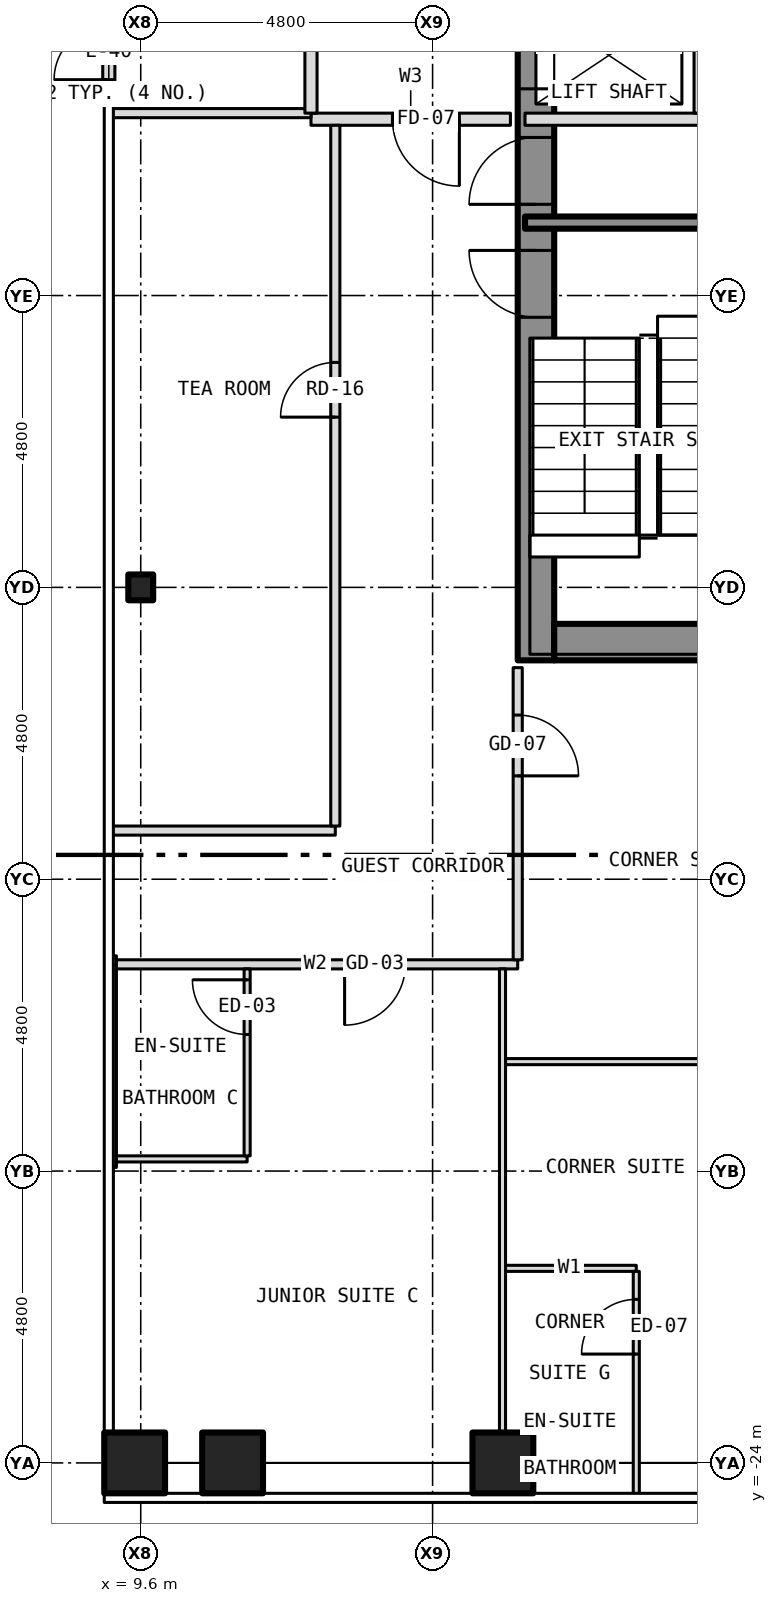
"""IFC4 building model, lengths in metres.
Left out: names, types, materials, properties, quantities, classifications, styles, units other than length and angle.
Written with IfcOpenShell. Run it as: python <this file> out.ifc"""

import sys

from ifc_helpers import new_model, si_unit, direction, frame, frame_2d, origin, origin_2d, place, context, subcontext, project, spatial, rectangle, hollow_rectangle, i_section, extrude, element, fill, save


model = new_model("IFC4")
c1 = context("Model", 3, precision=1e-05, world=origin(), true_north=direction((0.0, 1.0)))
c2 = subcontext(c1, "Body", "Model", "MODEL_VIEW")
j1 = project(units=[si_unit("LENGTHUNIT", "METRE"), si_unit("PLANEANGLEUNIT", "RADIAN")], contexts=[c1])
p1 = place(None, origin())
s1 = spatial("IfcSite", under=j1, at=p1, CompositionType="ELEMENT")
p2 = place(p1, origin())
s2 = spatial("IfcBuilding", under=s1, at=p2, CompositionType="ELEMENT")
p3 = place(p2, frame((0.0, 0.0, 81.0)))
s3 = spatial("IfcBuildingStorey", under=s2, at=p3, CompositionType="ELEMENT", Elevation=81.0)
for number, where, z_axis, x_axis in (
    (1, (11.111, -24.0, -0.15), (0.0, 0.0, 1.0), (1.0, 0.0, 0.0)),
    (2, (15.556, -24.0, -0.15), (0.0, 0.0, 1.0), (1.0, 0.0, 0.0)),
    (3, (9.5, -24.0, -0.15), (0.0, 0.0, 1.0), (1.0, 0.0, 0.0)),
):
    element("IfcColumn", number, at=place(p3, frame(where, z_axis=z_axis, x_axis=x_axis)), inside=s3, PredefinedType="COLUMN", context=c2, shape_type="SweptSolid", body=[
        extrude(hollow_rectangle(XDim=1.0, YDim=1.0, WallThickness=0.06, at=origin_2d()), origin(), (0.0, 0.0, 1.0), 3.35),
    ])
p4 = place(p3, frame((9.6, -9.6, -0.15), z_axis=(0.0, 0.0, 1.0), x_axis=(1.0, 0.0, 0.0)))
e4 = element("IfcColumn", 4, at=p4, inside=s3, PredefinedType="COLUMN", context=c2, shape_type="SweptSolid", body=[
    extrude(i_section(OverallWidth=0.409, OverallDepth=0.424, WebThickness=0.033, FlangeThickness=0.052, at=origin_2d()), origin(), (0.0, 0.0, 1.0), 3.35),
])
p5 = place(p3, frame((16.1, -10.8, 0.0), z_axis=(0.0, 0.0, 1.0), x_axis=(0.0, 1.0, 0.0)))
e5 = element("IfcWall", 5, at=p5, inside=s3, PredefinedType="SHEAR", context=c2, shape_type="SweptSolid", body=[
    extrude(rectangle(XDim=21.6, YDim=0.6, at=frame_2d((10.8, 0.0))), origin(), (0.0, 0.0, 1.0), 2.9),
])
p6 = place(p5, frame((9.4, 0.0, 0.0)))
e6 = element("IfcOpeningElement", 6, at=p6, cuts=e5, PredefinedType="OPENING", context=c2, shape_type="SweptSolid", body=[
    extrude(rectangle(XDim=1.1, YDim=2.1, at=frame_2d((0.55, 1.05))), frame((0.0, 0.312, 0.0), z_axis=(0.0, -1.0, 0.0), x_axis=(1.0, 0.0, 0.0)), (0.0, 0.0, 1.0), 0.624),
])
p7 = place(p5, frame((11.5, 0.0, 0.0)))
e7 = element("IfcOpeningElement", 7, at=p7, cuts=e5, PredefinedType="OPENING", context=c2, shape_type="SweptSolid", body=[
    extrude(rectangle(XDim=1.1, YDim=2.1, at=frame_2d((0.55, 1.05))), frame((0.0, 0.312, 0.0), z_axis=(0.0, -1.0, 0.0), x_axis=(1.0, 0.0, 0.0)), (0.0, 0.0, 1.0), 0.624),
])
p8 = place(p5, frame((13.6, 0.0, 0.0)))
e8 = element("IfcOpeningElement", 8, at=p8, cuts=e5, PredefinedType="OPENING", context=c2, shape_type="SweptSolid", body=[
    extrude(rectangle(XDim=1.1, YDim=2.1, at=frame_2d((0.55, 1.05))), frame((0.0, 0.312, 0.0), z_axis=(0.0, -1.0, 0.0), x_axis=(1.0, 0.0, 0.0)), (0.0, 0.0, 1.0), 0.624),
])
p9 = place(p5, frame((15.7, 0.0, 0.0)))
e9 = element("IfcOpeningElement", 9, at=p9, cuts=e5, PredefinedType="OPENING", context=c2, shape_type="SweptSolid", body=[
    extrude(rectangle(XDim=1.1, YDim=2.1, at=frame_2d((0.55, 1.05))), frame((0.0, 0.312, 0.0), z_axis=(0.0, -1.0, 0.0), x_axis=(1.0, 0.0, 0.0)), (0.0, 0.0, 1.0), 0.624),
])
p10 = place(p5, frame((17.8, 0.0, 0.0)))
e10 = element("IfcOpeningElement", 10, at=p10, cuts=e5, PredefinedType="OPENING", context=c2, shape_type="SweptSolid", body=[
    extrude(rectangle(XDim=1.1, YDim=2.1, at=frame_2d((0.55, 1.05))), frame((0.0, 0.312, 0.0), z_axis=(0.0, -1.0, 0.0), x_axis=(1.0, 0.0, 0.0)), (0.0, 0.0, 1.0), 0.624),
])
p11 = place(p5, frame((5.642, 0.0, 0.0)))
e11 = element("IfcOpeningElement", 11, at=p11, cuts=e5, PredefinedType="OPENING", context=c2, shape_type="SweptSolid", body=[
    extrude(rectangle(XDim=1.1, YDim=2.1, at=frame_2d((0.55, 1.05))), frame((0.0, 0.312, 0.0), z_axis=(0.0, -1.0, 0.0), x_axis=(1.0, 0.0, 0.0)), (0.0, 0.0, 1.0), 0.624),
])
p12 = place(p5, frame((7.5, 0.0, 0.0)))
e12 = element("IfcOpeningElement", 12, at=p12, cuts=e5, PredefinedType="OPENING", context=c2, shape_type="SweptSolid", body=[
    extrude(rectangle(XDim=1.1, YDim=2.1, at=frame_2d((0.55, 1.05))), frame((0.0, 0.312, 0.0), z_axis=(0.0, -1.0, 0.0), x_axis=(1.0, 0.0, 0.0)), (0.0, 0.0, 1.0), 0.624),
])
p13 = place(p3, frame((16.4, -10.5, 0.0), z_axis=(0.0, 0.0, 1.0), x_axis=(1.0, 0.0, 0.0)))
e13 = element("IfcWall", 13, at=p13, inside=s3, PredefinedType="SHEAR", context=c2, shape_type="SweptSolid", body=[
    extrude(rectangle(XDim=7.0, YDim=0.6, at=frame_2d((3.5, 0.0))), origin(), (0.0, 0.0, 1.0), 2.9),
])
p14 = place(p3, frame((9.075, -1.4, 0.0), z_axis=(0.0, 0.0, 1.0), x_axis=(0.0, 1.0, 0.0)))
e14 = element("IfcWall", 14, at=p14, inside=s3, PredefinedType="SOLIDWALL", context=c2, shape_type="SweptSolid", body=[
    extrude(rectangle(XDim=2.8, YDim=0.2, at=frame_2d((1.4, 0.0))), origin(), (0.0, 0.0, 1.0), 3.5),
])
p15 = place(p14, frame((0.15, 0.0, 0.0)))
e15 = element("IfcOpeningElement", 15, at=p15, cuts=e14, PredefinedType="OPENING", context=c2, shape_type="SweptSolid", body=[
    extrude(rectangle(XDim=0.9, YDim=2.1, at=frame_2d((0.45, 1.05))), frame((0.0, 0.112, 0.0), z_axis=(0.0, -1.0, 0.0), x_axis=(1.0, 0.0, 0.0)), (0.0, 0.0, 1.0), 0.224),
])
p16 = place(p14, frame((1.75, 0.0, 0.0)))
e16 = element("IfcOpeningElement", 16, at=p16, cuts=e14, PredefinedType="OPENING", context=c2, shape_type="SweptSolid", body=[
    extrude(rectangle(XDim=0.9, YDim=2.1, at=frame_2d((0.45, 1.05))), frame((0.0, 0.112, 0.0), z_axis=(0.0, -1.0, 0.0), x_axis=(1.0, 0.0, 0.0)), (0.0, 0.0, 1.0), 0.224),
])
p17 = place(p3, frame((15.55, -20.8, 0.0), z_axis=(0.0, 0.0, 1.0), x_axis=(1.0, 0.0, 0.0)))
e17 = element("IfcWall", 17, at=p17, inside=s3, PredefinedType="PARTITIONING", context=c2, shape_type="SweptSolid", body=[
    extrude(rectangle(XDim=2.2, YDim=0.1, at=frame_2d((1.1, 0.0))), origin(), (0.0, 0.0, 1.0), 3.2),
])
p18 = place(p3, frame((9.15, -19.0, 0.0), z_axis=(0.0, 0.0, 1.0), x_axis=(1.0, 0.0, 0.0)))
e18 = element("IfcWall", 18, at=p18, inside=s3, PredefinedType="PARTITIONING", context=c2, shape_type="SweptSolid", body=[
    extrude(rectangle(XDim=2.2, YDim=0.1, at=frame_2d((1.1, 0.0))), origin(), (0.0, 0.0, 1.0), 3.2),
])
p19 = place(p3, frame((15.55, -17.4, 0.0), z_axis=(0.0, 0.0, 1.0), x_axis=(1.0, 0.0, 0.0)))
e19 = element("IfcWall", 19, at=p19, inside=s3, PredefinedType="PARTITIONING", context=c2, shape_type="SweptSolid", body=[
    extrude(rectangle(XDim=8.98, YDim=0.1, at=frame_2d((4.49, 0.0))), origin(), (0.0, 0.0, 1.0), 3.2),
])
p20 = place(p19, frame((3.778, 0.0, 0.0)))
e20 = element("IfcOpeningElement", 20, at=p20, cuts=e19, PredefinedType="OPENING", context=c2, shape_type="SweptSolid", body=[
    extrude(rectangle(XDim=0.9, YDim=2.1, at=frame_2d((0.45, 1.05))), frame((0.0, 0.062, 0.0), z_axis=(0.0, -1.0, 0.0), x_axis=(1.0, 0.0, 0.0)), (0.0, 0.0, 1.0), 0.124),
])
p21 = place(p3, frame((9.15, -15.8, 0.0), z_axis=(0.0, 0.0, 1.0), x_axis=(1.0, 0.0, 0.0)))
e21 = element("IfcWall", 21, at=p21, inside=s3, PredefinedType="PARTITIONING", context=c2, shape_type="SweptSolid", body=[
    extrude(rectangle(XDim=6.65, YDim=0.15, at=frame_2d((3.325, 0.0))), origin(), (0.0, 0.0, 1.0), 3.2),
])
p22 = place(p21, frame((3.803, 0.0, 0.0)))
e22 = element("IfcOpeningElement", 22, at=p22, cuts=e21, PredefinedType="OPENING", context=c2, shape_type="SweptSolid", body=[
    extrude(rectangle(XDim=1.0, YDim=2.1, at=frame_2d((0.5, 1.05))), frame((0.0, 0.087, 0.0), z_axis=(0.0, -1.0, 0.0), x_axis=(1.0, 0.0, 0.0)), (0.0, 0.0, 1.0), 0.174),
])
p23 = place(p3, frame((9.12, -13.6, 0.0), z_axis=(0.0, 0.0, 1.0), x_axis=(1.0, 0.0, 0.0)))
e23 = element("IfcWall", 23, at=p23, inside=s3, PredefinedType="PARTITIONING", context=c2, shape_type="SweptSolid", body=[
    extrude(rectangle(XDim=3.68, YDim=0.15, at=frame_2d((1.84, 0.0))), origin(), (0.0, 0.0, 1.0), 3.2),
])
p24 = place(p3, frame((15.92, -3.6, 0.0), z_axis=(0.0, 0.0, 1.0), x_axis=(1.0, 0.0, 0.0)))
e24 = element("IfcWall", 24, at=p24, inside=s3, PredefinedType="SHEAR", context=c2, shape_type="SweptSolid", body=[
    extrude(rectangle(XDim=4.08, YDim=0.2, at=frame_2d((2.04, 0.0))), origin(), (0.0, 0.0, 1.0), 2.9),
])
p25 = place(p3, frame((12.4, -1.9, 0.0), z_axis=(0.0, 0.0, 1.0), x_axis=(1.0, 0.0, 0.0)))
e25 = element("IfcWall", 25, at=p25, inside=s3, PredefinedType="PARTITIONING", context=c2, shape_type="SweptSolid", body=[
    extrude(rectangle(XDim=3.28, YDim=0.2, at=frame_2d((1.64, 0.0))), origin(), (0.0, 0.0, 1.0), 3.2),
])
p26 = place(p25, frame((1.34, 0.0, 0.0)))
e26 = element("IfcOpeningElement", 26, at=p26, cuts=e25, PredefinedType="OPENING", context=c2, shape_type="SweptSolid", body=[
    extrude(rectangle(XDim=1.1, YDim=2.1, at=frame_2d((0.55, 1.05))), frame((0.0, 0.112, 0.0), z_axis=(0.0, -1.0, 0.0), x_axis=(1.0, 0.0, 0.0)), (0.0, 0.0, 1.0), 0.224),
])
p27 = place(p3, frame((15.92, -1.9, 0.0), z_axis=(0.0, 0.0, 1.0), x_axis=(1.0, 0.0, 0.0)))
e27 = element("IfcWall", 27, at=p27, inside=s3, PredefinedType="PARTITIONING", context=c2, shape_type="SweptSolid", body=[
    extrude(rectangle(XDim=7.96, YDim=0.2, at=frame_2d((3.98, 0.0))), origin(), (0.0, 0.0, 1.0), 2.9),
])
p28 = place(p27, frame((3.74, 0.0, 0.0)))
e28 = element("IfcOpeningElement", 28, at=p28, cuts=e27, PredefinedType="OPENING", context=c2, shape_type="SweptSolid", body=[
    extrude(rectangle(XDim=0.9, YDim=2.1, at=frame_2d((0.45, 1.05))), frame((0.0, 0.112, 0.0), z_axis=(0.0, -1.0, 0.0), x_axis=(1.0, 0.0, 0.0)), (0.0, 0.0, 1.0), 0.224),
])
p29 = place(p3, frame((9.12, -1.8, 0.0), z_axis=(0.0, 0.0, 1.0), x_axis=(1.0, 0.0, 0.0)))
e29 = element("IfcWall", 29, at=p29, inside=s3, PredefinedType="PARTITIONING", context=c2, shape_type="SweptSolid", body=[
    extrude(rectangle(XDim=3.28, YDim=0.15, at=frame_2d((1.64, 0.0))), origin(), (0.0, 0.0, 1.0), 3.2),
])
p30 = place(p3, frame((9.15, -19.14, 0.0), z_axis=(0.0, 0.0, 1.0), x_axis=(0.0, 1.0, 0.0)))
e30 = element("IfcWall", 30, at=p30, inside=s3, PredefinedType="PARTITIONING", context=c2, shape_type="SweptSolid", body=[
    extrude(rectangle(XDim=3.48, YDim=0.1, at=frame_2d((1.74, 0.0))), origin(), (0.0, 0.0, 1.0), 3.2),
])
p31 = place(p3, frame((11.35, -18.95, 0.0), z_axis=(0.0, 0.0, 1.0), x_axis=(0.0, 1.0, 0.0)))
e31 = element("IfcWall", 31, at=p31, inside=s3, PredefinedType="PARTITIONING", context=c2, shape_type="SweptSolid", body=[
    extrude(rectangle(XDim=3.075, YDim=0.1, at=frame_2d((1.538, 0.0))), origin(), (0.0, 0.0, 1.0), 3.2),
])
p32 = place(p31, frame((1.996, 0.0, 0.0)))
e32 = element("IfcOpeningElement", 32, at=p32, cuts=e31, PredefinedType="OPENING", context=c2, shape_type="SweptSolid", body=[
    extrude(rectangle(XDim=0.9, YDim=2.1, at=frame_2d((0.45, 1.05))), frame((0.0, 0.062, 0.0), z_axis=(0.0, -1.0, 0.0), x_axis=(1.0, 0.0, 0.0)), (0.0, 0.0, 1.0), 0.124),
])
p33 = place(p3, frame((12.4, -1.8, 0.0), z_axis=(0.0, 0.0, 1.0), x_axis=(0.0, 1.0, 0.0)))
e33 = element("IfcWall", 33, at=p33, inside=s3, PredefinedType="PARTITIONING", context=c2, shape_type="SweptSolid", body=[
    extrude(rectangle(XDim=4.0, YDim=0.2, at=frame_2d((2.0, 0.0))), origin(), (0.0, 0.0, 1.0), 3.2),
])
p34 = place(p33, frame((1.25, 0.0, 0.0)))
e34 = element("IfcOpeningElement", 34, at=p34, cuts=e33, PredefinedType="OPENING", context=c2, shape_type="SweptSolid", body=[
    extrude(rectangle(XDim=1.1, YDim=2.1, at=frame_2d((0.55, 1.05))), frame((0.0, 0.112, 0.0), z_axis=(0.0, -1.0, 0.0), x_axis=(1.0, 0.0, 0.0)), (0.0, 0.0, 1.0), 0.224),
])
p35 = place(p3, frame((12.8, -13.525, 0.0), z_axis=(0.0, 0.0, 1.0), x_axis=(0.0, 1.0, 0.0)))
e35 = element("IfcWall", 35, at=p35, inside=s3, PredefinedType="PARTITIONING", context=c2, shape_type="SweptSolid", body=[
    extrude(rectangle(XDim=11.525, YDim=0.15, at=frame_2d((5.762, 0.0))), origin(), (0.0, 0.0, 1.0), 3.2),
])
p36 = place(p35, frame((6.725, 0.0, 0.0)))
e36 = element("IfcOpeningElement", 36, at=p36, cuts=e35, PredefinedType="OPENING", context=c2, shape_type="SweptSolid", body=[
    extrude(rectangle(XDim=0.9, YDim=2.1, at=frame_2d((0.45, 1.05))), frame((0.0, 0.087, 0.0), z_axis=(0.0, -1.0, 0.0), x_axis=(1.0, 0.0, 0.0)), (0.0, 0.0, 1.0), 0.174),
])
p37 = place(p3, frame((15.55, -23.88, 0.0), z_axis=(0.0, 0.0, 1.0), x_axis=(0.0, 1.0, 0.0)))
e37 = element("IfcWall", 37, at=p37, inside=s3, PredefinedType="PARTITIONING", context=c2, shape_type="SweptSolid", body=[
    extrude(rectangle(XDim=8.005, YDim=0.1, at=frame_2d((4.002, 0.0))), origin(), (0.0, 0.0, 1.0), 3.2),
])
p38 = place(p3, frame((15.8, -15.725, 0.0), z_axis=(0.0, 0.0, 1.0), x_axis=(0.0, 1.0, 0.0)))
e38 = element("IfcWall", 38, at=p38, inside=s3, PredefinedType="PARTITIONING", context=c2, shape_type="SweptSolid", body=[
    extrude(rectangle(XDim=4.805, YDim=0.15, at=frame_2d((2.403, 0.0))), origin(), (0.0, 0.0, 1.0), 3.2),
])
p39 = place(p38, frame((3.025, 0.0, 0.0)))
e39 = element("IfcOpeningElement", 39, at=p39, cuts=e38, PredefinedType="OPENING", context=c2, shape_type="SweptSolid", body=[
    extrude(rectangle(XDim=1.0, YDim=2.1, at=frame_2d((0.5, 1.05))), frame((0.0, 0.087, 0.0), z_axis=(0.0, -1.0, 0.0), x_axis=(1.0, 0.0, 0.0)), (0.0, 0.0, 1.0), 0.174),
])
p40 = place(p3, frame((17.75, -24.53, 0.0), z_axis=(0.0, 0.0, 1.0), x_axis=(0.0, 1.0, 0.0)))
e40 = element("IfcWall", 40, at=p40, inside=s3, PredefinedType="PARTITIONING", context=c2, shape_type="SweptSolid", body=[
    extrude(rectangle(XDim=3.68, YDim=0.1, at=frame_2d((1.84, 0.0))), origin(), (0.0, 0.0, 1.0), 3.2),
])
p41 = place(p40, frame((2.32, 0.0, 0.0)))
e41 = element("IfcOpeningElement", 41, at=p41, cuts=e40, PredefinedType="OPENING", context=c2, shape_type="SweptSolid", body=[
    extrude(rectangle(XDim=0.9, YDim=2.1, at=frame_2d((0.45, 1.05))), frame((0.0, 0.062, 0.0), z_axis=(0.0, -1.0, 0.0), x_axis=(1.0, 0.0, 0.0)), (0.0, 0.0, 1.0), 0.124),
])
p42 = place(p3, frame((18.8, -1.8, 0.0), z_axis=(0.0, 0.0, 1.0), x_axis=(0.0, 1.0, 0.0)))
e42 = element("IfcWall", 42, at=p42, inside=s3, PredefinedType="PARTITIONING", context=c2, shape_type="SweptSolid", body=[
    extrude(rectangle(XDim=12.48, YDim=0.2, at=frame_2d((6.24, 0.0))), origin(), (0.0, 0.0, 1.0), 2.9),
])
p43 = place(p15, origin())
e43 = element("IfcDoor", 43, at=p43, inside=s3, OperationType="SINGLE_SWING_LEFT", PredefinedType="DOOR", context=c2, shape_type="SweptSolid", body=[
    extrude(rectangle(XDim=0.9, YDim=2.1, at=frame_2d((0.45, 1.05))), frame((0.0, 0.025, 0.0), z_axis=(0.0, -1.0, 0.0), x_axis=(1.0, 0.0, 0.0)), (0.0, 0.0, 1.0), 0.05),
])
fill(e15, e43)
p44 = place(p6, origin())
e44 = element("IfcDoor", 44, at=p44, inside=s3, OperationType="SLIDING_TO_LEFT", PredefinedType="DOOR", context=c2, shape_type="SweptSolid", body=[
    extrude(rectangle(XDim=1.1, YDim=2.1, at=frame_2d((0.55, 1.05))), frame((0.0, 0.025, 0.0), z_axis=(0.0, -1.0, 0.0), x_axis=(1.0, 0.0, 0.0)), (0.0, 0.0, 1.0), 0.05),
])
fill(e6, e44)
p45 = place(p11, origin())
e45 = element("IfcDoor", 45, at=p45, inside=s3, OperationType="SINGLE_SWING_RIGHT", PredefinedType="DOOR", context=c2, shape_type="SweptSolid", body=[
    extrude(rectangle(XDim=1.1, YDim=2.1, at=frame_2d((0.55, 1.05))), frame((0.0, 0.025, 0.0), z_axis=(0.0, -1.0, 0.0), x_axis=(1.0, 0.0, 0.0)), (0.0, 0.0, 1.0), 0.05),
])
fill(e11, e45)
p46 = place(p12, origin())
e46 = element("IfcDoor", 46, at=p46, inside=s3, OperationType="SINGLE_SWING_LEFT", PredefinedType="DOOR", context=c2, shape_type="SweptSolid", body=[
    extrude(rectangle(XDim=1.1, YDim=2.1, at=frame_2d((0.55, 1.05))), frame((0.0, 0.025, 0.0), z_axis=(0.0, -1.0, 0.0), x_axis=(1.0, 0.0, 0.0)), (0.0, 0.0, 1.0), 0.05),
])
fill(e12, e46)
p47 = place(p26, origin())
e47 = element("IfcDoor", 47, at=p47, inside=s3, OperationType="SINGLE_SWING_RIGHT", PredefinedType="DOOR", context=c2, shape_type="SweptSolid", body=[
    extrude(rectangle(XDim=1.1, YDim=2.1, at=frame_2d((0.55, 1.05))), frame((0.0, 0.025, 0.0), z_axis=(0.0, -1.0, 0.0), x_axis=(1.0, 0.0, 0.0)), (0.0, 0.0, 1.0), 0.05),
])
fill(e26, e47)
p48 = place(p22, origin())
e48 = element("IfcDoor", 48, at=p48, inside=s3, OperationType="SINGLE_SWING_LEFT", PredefinedType="DOOR", context=c2, shape_type="SweptSolid", body=[
    extrude(rectangle(XDim=1.0, YDim=2.1, at=frame_2d((0.5, 1.05))), frame((0.0, 0.025, 0.0), z_axis=(0.0, -1.0, 0.0), x_axis=(1.0, 0.0, 0.0)), (0.0, 0.0, 1.0), 0.05),
])
fill(e22, e48)
p49 = place(p32, origin())
e49 = element("IfcDoor", 49, at=p49, inside=s3, OperationType="SINGLE_SWING_RIGHT", PredefinedType="DOOR", context=c2, shape_type="SweptSolid", body=[
    extrude(rectangle(XDim=0.9, YDim=2.1, at=frame_2d((0.45, 1.05))), frame((0.0, 0.025, 0.0), z_axis=(0.0, -1.0, 0.0), x_axis=(1.0, 0.0, 0.0)), (0.0, 0.0, 1.0), 0.05),
])
fill(e32, e49)
p50 = place(p39, origin())
e50 = element("IfcDoor", 50, at=p50, inside=s3, OperationType="SINGLE_SWING_LEFT", PredefinedType="DOOR", context=c2, shape_type="SweptSolid", body=[
    extrude(rectangle(XDim=1.0, YDim=2.1, at=frame_2d((0.5, 1.05))), frame((0.0, 0.025, 0.0), z_axis=(0.0, -1.0, 0.0), x_axis=(1.0, 0.0, 0.0)), (0.0, 0.0, 1.0), 0.05),
])
fill(e39, e50)
p51 = place(p41, origin())
e51 = element("IfcDoor", 51, at=p51, inside=s3, OperationType="SINGLE_SWING_LEFT", PredefinedType="DOOR", context=c2, shape_type="SweptSolid", body=[
    extrude(rectangle(XDim=0.9, YDim=2.1, at=frame_2d((0.45, 1.05))), frame((0.0, 0.025, 0.0), z_axis=(0.0, -1.0, 0.0), x_axis=(1.0, 0.0, 0.0)), (0.0, 0.0, 1.0), 0.05),
])
fill(e41, e51)
p52 = place(p36, origin())
e52 = element("IfcDoor", 52, at=p52, inside=s3, OperationType="SINGLE_SWING_LEFT", PredefinedType="DOOR", context=c2, shape_type="SweptSolid", body=[
    extrude(rectangle(XDim=0.9, YDim=2.1, at=frame_2d((0.45, 1.05))), frame((0.0, 0.025, 0.0), z_axis=(0.0, -1.0, 0.0), x_axis=(1.0, 0.0, 0.0)), (0.0, 0.0, 1.0), 0.05),
])
fill(e36, e52)
save(model, sys.argv[1])
